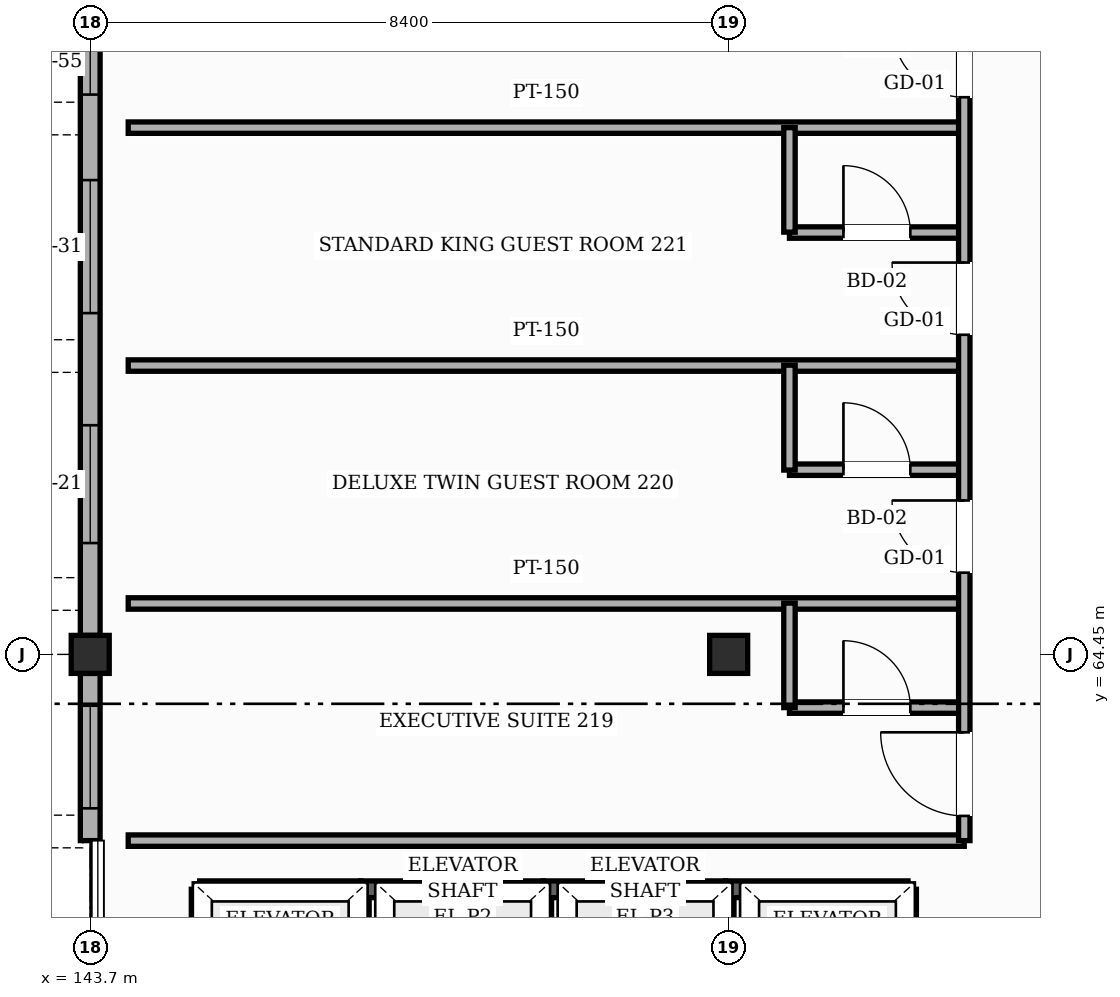
"""IFC4 building model, lengths in metres.
Left out: names, types, materials, properties, quantities, classifications, styles, units other than length and angle.
Written with IfcOpenShell. Run it as: python <this file> out.ifc"""

import sys

from ifc_helpers import new_model, si_unit, direction, frame, frame_2d, origin, origin_2d, place, context, subcontext, project, spatial, rectangle, hollow_rectangle, extrude, element, fill, save


model = new_model("IFC4")
c1 = context("Model", 3, precision=1e-05, world=origin(), true_north=direction((0.0, 1.0)))
c2 = subcontext(c1, "Body", "Model", "MODEL_VIEW")
j1 = project(units=[si_unit("LENGTHUNIT", "METRE"), si_unit("PLANEANGLEUNIT", "RADIAN")], contexts=[c1])
p1 = place(None, origin())
s1 = spatial("IfcSite", under=j1, at=p1, CompositionType="ELEMENT")
p2 = place(p1, origin())
s2 = spatial("IfcBuilding", under=s1, at=p2, CompositionType="ELEMENT")
p3 = place(p2, frame((0.0, 0.0, 35.4)))
s3 = spatial("IfcBuildingStorey", under=s2, at=p3, CompositionType="ELEMENT", Elevation=35.4)
for number, where, z_axis, x_axis in (
    (1, (143.7, 64.45, 0.0), (0.0, 0.0, 1.0), (1.0, 0.0, 0.0)),
    (2, (152.1, 64.45, 0.0), (0.0, 0.0, 1.0), (1.0, 0.0, 0.0)),
):
    element("IfcColumn", number, at=place(p3, frame(where, z_axis=z_axis, x_axis=x_axis)), inside=s3, PredefinedType="COLUMN", context=c2, shape_type="SweptSolid", body=[
        extrude(hollow_rectangle(XDim=0.5, YDim=0.5, WallThickness=0.022, InnerFilletRadius=0.022, OuterFilletRadius=0.044, at=origin_2d()), origin(), (0.0, 0.0, 1.0), 3.6),
    ])
p4 = place(p3, frame((143.7, 62.0, 0.0), z_axis=(0.0, 0.0, 1.0), x_axis=(0.0, 1.0, 0.0)))
e3 = element("IfcWall", 3, at=p4, inside=s3, PredefinedType="SOLIDWALL", context=c2, shape_type="SweptSolid", body=[
    extrude(rectangle(XDim=2.2, YDim=0.26, at=frame_2d((1.1, 0.0))), origin(), (0.0, 0.0, 1.0), 2.805),
])
p5 = place(p4, frame((0.425, 0.0, 0.85)))
e4 = element("IfcOpeningElement", 4, at=p5, cuts=e3, PredefinedType="OPENING", context=c2, shape_type="SweptSolid", body=[
    extrude(rectangle(XDim=1.35, YDim=1.35, at=frame_2d((0.675, 0.675))), frame((0.0, 0.14, 0.0), z_axis=(0.0, -1.0, 0.0), x_axis=(1.0, 0.0, 0.0)), (0.0, 0.0, 1.0), 0.28),
])
p6 = place(p3, frame((143.7, 64.7, 0.0), z_axis=(0.0, 0.0, 1.0), x_axis=(0.0, 1.0, 0.0)))
e5 = element("IfcWall", 5, at=p6, inside=s3, PredefinedType="SOLIDWALL", context=c2, shape_type="SweptSolid", body=[
    extrude(rectangle(XDim=8.4, YDim=0.26, at=frame_2d((4.2, 0.0))), origin(), (0.0, 0.0, 1.0), 2.655),
])
p7 = place(p6, frame((1.215, 0.0, 0.85)))
e6 = element("IfcOpeningElement", 6, at=p7, cuts=e5, PredefinedType="OPENING", context=c2, shape_type="SweptSolid", body=[
    extrude(rectangle(XDim=1.55, YDim=1.35, at=frame_2d((0.775, 0.675))), frame((0.0, 0.14, 0.0), z_axis=(0.0, -1.0, 0.0), x_axis=(1.0, 0.0, 0.0)), (0.0, 0.0, 1.0), 0.28),
])
p8 = place(p6, frame((4.24, 0.0, 0.85)))
e7 = element("IfcOpeningElement", 7, at=p8, cuts=e5, PredefinedType="OPENING", context=c2, shape_type="SweptSolid", body=[
    extrude(rectangle(XDim=1.75, YDim=1.35, at=frame_2d((0.875, 0.675))), frame((0.0, 0.14, 0.0), z_axis=(0.0, -1.0, 0.0), x_axis=(1.0, 0.0, 0.0)), (0.0, 0.0, 1.0), 0.28),
])
p9 = place(p6, frame((7.115, 0.0, 0.85)))
e8 = element("IfcOpeningElement", 8, at=p9, cuts=e5, PredefinedType="OPENING", context=c2, shape_type="SweptSolid", body=[
    extrude(rectangle(XDim=0.85, YDim=1.35, at=frame_2d((0.425, 0.675))), frame((0.0, 0.14, 0.0), z_axis=(0.0, -1.0, 0.0), x_axis=(1.0, 0.0, 0.0)), (0.0, 0.0, 1.0), 0.28),
])
p10 = place(p3, frame((145.14, 61.36, 0.0), z_axis=(0.0, 0.0, 1.0), x_axis=(1.0, 0.0, 0.0)))
e9 = element("IfcWall", 9, at=p10, inside=s3, PredefinedType="SHEAR", context=c2, shape_type="SweptSolid", body=[
    extrude(rectangle(XDim=2.12, YDim=0.22, at=frame_2d((1.06, 0.0))), origin(), (0.0, 0.0, 1.0), 3.38),
])
for number, where, z_axis, x_axis in (
    (10, (147.26, 59.44, 0.0), (0.0, 0.0, 1.0), (0.0, 1.0, 0.0)),
    (11, (145.14, 59.44, 0.0), (0.0, 0.0, 1.0), (0.0, 1.0, 0.0)),
):
    element("IfcWall", number, at=place(p3, frame(where, z_axis=z_axis, x_axis=x_axis)), inside=s3, PredefinedType="SHEAR", context=c2, shape_type="SweptSolid", body=[
        extrude(rectangle(XDim=1.92, YDim=0.22, at=frame_2d((0.96, 0.0))), origin(), (0.0, 0.0, 1.0), 3.38),
    ])
p11 = place(p3, frame((147.26, 61.36, 0.0), z_axis=(0.0, 0.0, 1.0), x_axis=(1.0, 0.0, 0.0)))
e12 = element("IfcWall", 12, at=p11, inside=s3, PredefinedType="SHEAR", context=c2, shape_type="SweptSolid", body=[
    extrude(rectangle(XDim=2.4, YDim=0.22, at=frame_2d((1.2, 0.0))), origin(), (0.0, 0.0, 1.0), 3.38),
])
p12 = place(p3, frame((149.66, 59.44, 0.0), z_axis=(0.0, 0.0, 1.0), x_axis=(0.0, 1.0, 0.0)))
e13 = element("IfcWall", 13, at=p12, inside=s3, PredefinedType="SHEAR", context=c2, shape_type="SweptSolid", body=[
    extrude(rectangle(XDim=1.92, YDim=0.22, at=frame_2d((0.96, 0.0))), origin(), (0.0, 0.0, 1.0), 3.38),
])
p13 = place(p3, frame((149.66, 61.36, 0.0), z_axis=(0.0, 0.0, 1.0), x_axis=(1.0, 0.0, 0.0)))
e14 = element("IfcWall", 14, at=p13, inside=s3, PredefinedType="SHEAR", context=c2, shape_type="SweptSolid", body=[
    extrude(rectangle(XDim=2.4, YDim=0.22, at=frame_2d((1.2, 0.0))), origin(), (0.0, 0.0, 1.0), 3.38),
])
p14 = place(p3, frame((152.06, 59.44, 0.0), z_axis=(0.0, 0.0, 1.0), x_axis=(0.0, 1.0, 0.0)))
e15 = element("IfcWall", 15, at=p14, inside=s3, PredefinedType="SHEAR", context=c2, shape_type="SweptSolid", body=[
    extrude(rectangle(XDim=1.92, YDim=0.22, at=frame_2d((0.96, 0.0))), origin(), (0.0, 0.0, 1.0), 3.38),
])
p15 = place(p3, frame((152.06, 61.36, 0.0), z_axis=(0.0, 0.0, 1.0), x_axis=(1.0, 0.0, 0.0)))
e16 = element("IfcWall", 16, at=p15, inside=s3, PredefinedType="SHEAR", context=c2, shape_type="SweptSolid", body=[
    extrude(rectangle(XDim=2.4, YDim=0.22, at=frame_2d((1.2, 0.0))), origin(), (0.0, 0.0, 1.0), 3.38),
])
p16 = place(p3, frame((154.46, 59.44, 0.0), z_axis=(0.0, 0.0, 1.0), x_axis=(0.0, 1.0, 0.0)))
e17 = element("IfcWall", 17, at=p16, inside=s3, PredefinedType="SHEAR", context=c2, shape_type="SweptSolid", body=[
    extrude(rectangle(XDim=1.92, YDim=0.22, at=frame_2d((0.96, 0.0))), origin(), (0.0, 0.0, 1.0), 3.38),
])
p17 = place(p3, frame((144.2, 62.0, 0.0), z_axis=(0.0, 0.0, 1.0), x_axis=(1.0, 0.0, 0.0)))
e18 = element("IfcWall", 18, at=p17, inside=s3, PredefinedType="PARTITIONING", context=c2, shape_type="SweptSolid", body=[
    extrude(rectangle(XDim=11.0, YDim=0.15, at=frame_2d((5.5, 0.0))), origin(), (0.0, 0.0, 1.0), 3.365),
])
p18 = place(p3, frame((152.9, 63.75, 0.0), z_axis=(0.0, 0.0, 1.0), x_axis=(1.0, 0.0, 0.0)))
e19 = element("IfcWall", 19, at=p18, inside=s3, PredefinedType="PARTITIONING", context=c2, shape_type="SweptSolid", body=[
    extrude(rectangle(XDim=2.3, YDim=0.15, at=frame_2d((1.15, 0.0))), origin(), (0.0, 0.0, 1.0), 3.365),
])
p19 = place(p18, frame((0.71, 0.0, 0.0)))
e20 = element("IfcOpeningElement", 20, at=p19, cuts=e19, PredefinedType="OPENING", context=c2, shape_type="SweptSolid", body=[
    extrude(rectangle(XDim=0.88, YDim=2.12, at=frame_2d((0.44, 1.06))), frame((0.0, 0.085, 0.0), z_axis=(0.0, -1.0, 0.0), x_axis=(1.0, 0.0, 0.0)), (0.0, 0.0, 1.0), 0.17),
])
p20 = place(p3, frame((144.2, 65.12, 0.0), z_axis=(0.0, 0.0, 1.0), x_axis=(1.0, 0.0, 0.0)))
e21 = element("IfcWall", 21, at=p20, inside=s3, PredefinedType="PARTITIONING", context=c2, shape_type="SweptSolid", body=[
    extrude(rectangle(XDim=11.0, YDim=0.15, at=frame_2d((5.5, 0.0))), origin(), (0.0, 0.0, 1.0), 3.365),
])
p21 = place(p3, frame((152.9, 66.88, 0.0), z_axis=(0.0, 0.0, 1.0), x_axis=(1.0, 0.0, 0.0)))
e22 = element("IfcWall", 22, at=p21, inside=s3, PredefinedType="PARTITIONING", context=c2, shape_type="SweptSolid", body=[
    extrude(rectangle(XDim=2.3, YDim=0.15, at=frame_2d((1.15, 0.0))), origin(), (0.0, 0.0, 1.0), 3.365),
])
p22 = place(p21, frame((0.71, 0.0, 0.0)))
e23 = element("IfcOpeningElement", 23, at=p22, cuts=e22, PredefinedType="OPENING", context=c2, shape_type="SweptSolid", body=[
    extrude(rectangle(XDim=0.88, YDim=2.12, at=frame_2d((0.44, 1.06))), frame((0.0, 0.085, 0.0), z_axis=(0.0, -1.0, 0.0), x_axis=(1.0, 0.0, 0.0)), (0.0, 0.0, 1.0), 0.17),
])
p23 = place(p3, frame((144.2, 68.25, 0.0), z_axis=(0.0, 0.0, 1.0), x_axis=(1.0, 0.0, 0.0)))
e24 = element("IfcWall", 24, at=p23, inside=s3, PredefinedType="PARTITIONING", context=c2, shape_type="SweptSolid", body=[
    extrude(rectangle(XDim=11.0, YDim=0.15, at=frame_2d((5.5, 0.0))), origin(), (0.0, 0.0, 1.0), 3.365),
])
p24 = place(p3, frame((152.9, 70.0, 0.0), z_axis=(0.0, 0.0, 1.0), x_axis=(1.0, 0.0, 0.0)))
e25 = element("IfcWall", 25, at=p24, inside=s3, PredefinedType="PARTITIONING", context=c2, shape_type="SweptSolid", body=[
    extrude(rectangle(XDim=2.3, YDim=0.15, at=frame_2d((1.15, 0.0))), origin(), (0.0, 0.0, 1.0), 3.365),
])
p25 = place(p24, frame((0.71, 0.0, 0.0)))
e26 = element("IfcOpeningElement", 26, at=p25, cuts=e25, PredefinedType="OPENING", context=c2, shape_type="SweptSolid", body=[
    extrude(rectangle(XDim=0.88, YDim=2.12, at=frame_2d((0.44, 1.06))), frame((0.0, 0.085, 0.0), z_axis=(0.0, -1.0, 0.0), x_axis=(1.0, 0.0, 0.0)), (0.0, 0.0, 1.0), 0.17),
])
p26 = place(p3, frame((144.2, 71.38, 0.0), z_axis=(0.0, 0.0, 1.0), x_axis=(1.0, 0.0, 0.0)))
e27 = element("IfcWall", 27, at=p26, inside=s3, PredefinedType="PARTITIONING", context=c2, shape_type="SweptSolid", body=[
    extrude(rectangle(XDim=11.0, YDim=0.15, at=frame_2d((5.5, 0.0))), origin(), (0.0, 0.0, 1.0), 3.365),
])
p27 = place(p3, frame((152.9, 63.75, 0.0), z_axis=(0.0, 0.0, 1.0), x_axis=(0.0, 1.0, 0.0)))
e28 = element("IfcWall", 28, at=p27, inside=s3, PredefinedType="PARTITIONING", context=c2, shape_type="SweptSolid", body=[
    extrude(rectangle(XDim=1.375, YDim=0.15, at=frame_2d((0.688, 0.0))), origin(), (0.0, 0.0, 1.0), 3.365),
])
p28 = place(p3, frame((152.9, 66.875, 0.0), z_axis=(0.0, 0.0, 1.0), x_axis=(0.0, 1.0, 0.0)))
e29 = element("IfcWall", 29, at=p28, inside=s3, PredefinedType="PARTITIONING", context=c2, shape_type="SweptSolid", body=[
    extrude(rectangle(XDim=1.38, YDim=0.15, at=frame_2d((0.69, 0.0))), origin(), (0.0, 0.0, 1.0), 3.365),
])
p29 = place(p3, frame((152.9, 70.005, 0.0), z_axis=(0.0, 0.0, 1.0), x_axis=(0.0, 1.0, 0.0)))
e30 = element("IfcWall", 30, at=p29, inside=s3, PredefinedType="PARTITIONING", context=c2, shape_type="SweptSolid", body=[
    extrude(rectangle(XDim=1.375, YDim=0.15, at=frame_2d((0.688, 0.0))), origin(), (0.0, 0.0, 1.0), 3.365),
])
p30 = place(p3, frame((155.2, 62.0, 0.0), z_axis=(0.0, 0.0, 1.0), x_axis=(0.0, 1.0, 0.0)))
e31 = element("IfcWall", 31, at=p30, inside=s3, PredefinedType="PARTITIONING", context=c2, shape_type="SweptSolid", body=[
    extrude(rectangle(XDim=34.4, YDim=0.15, at=frame_2d((17.2, 0.0))), origin(), (0.0, 0.0, 1.0), 3.365),
])
p31 = place(p30, frame((0.325, 0.0, 0.0)))
e32 = element("IfcOpeningElement", 32, at=p31, cuts=e31, PredefinedType="OPENING", context=c2, shape_type="SweptSolid", body=[
    extrude(rectangle(XDim=1.1, YDim=2.2, at=frame_2d((0.55, 1.1))), frame((0.0, 0.085, 0.0), z_axis=(0.0, -1.0, 0.0), x_axis=(1.0, 0.0, 0.0)), (0.0, 0.0, 1.0), 0.17),
])
p32 = place(p30, frame((3.525, 0.0, 0.0)))
e33 = element("IfcOpeningElement", 33, at=p32, cuts=e31, PredefinedType="OPENING", context=c2, shape_type="SweptSolid", body=[
    extrude(rectangle(XDim=0.95, YDim=2.15, at=frame_2d((0.475, 1.075))), frame((0.0, 0.085, 0.0), z_axis=(0.0, -1.0, 0.0), x_axis=(1.0, 0.0, 0.0)), (0.0, 0.0, 1.0), 0.17),
])
p33 = place(p30, frame((6.655, 0.0, 0.0)))
e34 = element("IfcOpeningElement", 34, at=p33, cuts=e31, PredefinedType="OPENING", context=c2, shape_type="SweptSolid", body=[
    extrude(rectangle(XDim=0.95, YDim=2.15, at=frame_2d((0.475, 1.075))), frame((0.0, 0.085, 0.0), z_axis=(0.0, -1.0, 0.0), x_axis=(1.0, 0.0, 0.0)), (0.0, 0.0, 1.0), 0.17),
])
p34 = place(p30, frame((9.78, 0.0, 0.0)))
e35 = element("IfcOpeningElement", 35, at=p34, cuts=e31, PredefinedType="OPENING", context=c2, shape_type="SweptSolid", body=[
    extrude(rectangle(XDim=0.95, YDim=2.15, at=frame_2d((0.475, 1.075))), frame((0.0, 0.085, 0.0), z_axis=(0.0, -1.0, 0.0), x_axis=(1.0, 0.0, 0.0)), (0.0, 0.0, 1.0), 0.17),
])
p35 = place(p30, frame((12.91, 0.0, 0.0)))
e36 = element("IfcOpeningElement", 36, at=p35, cuts=e31, PredefinedType="OPENING", context=c2, shape_type="SweptSolid", body=[
    extrude(rectangle(XDim=0.95, YDim=2.15, at=frame_2d((0.475, 1.075))), frame((0.0, 0.085, 0.0), z_axis=(0.0, -1.0, 0.0), x_axis=(1.0, 0.0, 0.0)), (0.0, 0.0, 1.0), 0.17),
])
p36 = place(p30, frame((16.035, 0.0, 0.0)))
e37 = element("IfcOpeningElement", 37, at=p36, cuts=e31, PredefinedType="OPENING", context=c2, shape_type="SweptSolid", body=[
    extrude(rectangle(XDim=0.95, YDim=2.15, at=frame_2d((0.475, 1.075))), frame((0.0, 0.085, 0.0), z_axis=(0.0, -1.0, 0.0), x_axis=(1.0, 0.0, 0.0)), (0.0, 0.0, 1.0), 0.17),
])
p37 = place(p30, frame((19.165, 0.0, 0.0)))
e38 = element("IfcOpeningElement", 38, at=p37, cuts=e31, PredefinedType="OPENING", context=c2, shape_type="SweptSolid", body=[
    extrude(rectangle(XDim=0.95, YDim=2.15, at=frame_2d((0.475, 1.075))), frame((0.0, 0.085, 0.0), z_axis=(0.0, -1.0, 0.0), x_axis=(1.0, 0.0, 0.0)), (0.0, 0.0, 1.0), 0.17),
])
p38 = place(p30, frame((22.29, 0.0, 0.0)))
e39 = element("IfcOpeningElement", 39, at=p38, cuts=e31, PredefinedType="OPENING", context=c2, shape_type="SweptSolid", body=[
    extrude(rectangle(XDim=0.95, YDim=2.15, at=frame_2d((0.475, 1.075))), frame((0.0, 0.085, 0.0), z_axis=(0.0, -1.0, 0.0), x_axis=(1.0, 0.0, 0.0)), (0.0, 0.0, 1.0), 0.17),
])
p39 = place(p30, frame((25.42, 0.0, 0.0)))
e40 = element("IfcOpeningElement", 40, at=p39, cuts=e31, PredefinedType="OPENING", context=c2, shape_type="SweptSolid", body=[
    extrude(rectangle(XDim=0.95, YDim=2.15, at=frame_2d((0.475, 1.075))), frame((0.0, 0.085, 0.0), z_axis=(0.0, -1.0, 0.0), x_axis=(1.0, 0.0, 0.0)), (0.0, 0.0, 1.0), 0.17),
])
p40 = place(p30, frame((28.545, 0.0, 0.0)))
e41 = element("IfcOpeningElement", 41, at=p40, cuts=e31, PredefinedType="OPENING", context=c2, shape_type="SweptSolid", body=[
    extrude(rectangle(XDim=0.95, YDim=2.15, at=frame_2d((0.475, 1.075))), frame((0.0, 0.085, 0.0), z_axis=(0.0, -1.0, 0.0), x_axis=(1.0, 0.0, 0.0)), (0.0, 0.0, 1.0), 0.17),
])
p41 = place(p30, frame((31.675, 0.0, 0.0)))
e42 = element("IfcOpeningElement", 42, at=p41, cuts=e31, PredefinedType="OPENING", context=c2, shape_type="SweptSolid", body=[
    extrude(rectangle(XDim=0.95, YDim=2.15, at=frame_2d((0.475, 1.075))), frame((0.0, 0.085, 0.0), z_axis=(0.0, -1.0, 0.0), x_axis=(1.0, 0.0, 0.0)), (0.0, 0.0, 1.0), 0.17),
])
p42 = place(p5, origin())
e43 = element("IfcWindow", 43, at=p42, inside=s3, PartitioningType="SINGLE_PANEL", PredefinedType="WINDOW", context=c2, shape_type="SweptSolid", body=[
    extrude(rectangle(XDim=1.35, YDim=1.35, at=frame_2d((0.675, 0.675))), frame((0.0, 0.03, 0.0), z_axis=(0.0, -1.0, 0.0), x_axis=(1.0, 0.0, 0.0)), (0.0, 0.0, 1.0), 0.06),
])
fill(e4, e43)
p43 = place(p7, origin())
e44 = element("IfcWindow", 44, at=p43, inside=s3, PartitioningType="SINGLE_PANEL", PredefinedType="WINDOW", context=c2, shape_type="SweptSolid", body=[
    extrude(rectangle(XDim=1.55, YDim=1.35, at=frame_2d((0.775, 0.675))), frame((0.0, 0.03, 0.0), z_axis=(0.0, -1.0, 0.0), x_axis=(1.0, 0.0, 0.0)), (0.0, 0.0, 1.0), 0.06),
])
fill(e6, e44)
p44 = place(p8, origin())
e45 = element("IfcWindow", 45, at=p44, inside=s3, PartitioningType="SINGLE_PANEL", PredefinedType="WINDOW", context=c2, shape_type="SweptSolid", body=[
    extrude(rectangle(XDim=1.75, YDim=1.35, at=frame_2d((0.875, 0.675))), frame((0.0, 0.03, 0.0), z_axis=(0.0, -1.0, 0.0), x_axis=(1.0, 0.0, 0.0)), (0.0, 0.0, 1.0), 0.06),
])
fill(e7, e45)
p45 = place(p9, origin())
e46 = element("IfcWindow", 46, at=p45, inside=s3, PartitioningType="SINGLE_PANEL", PredefinedType="WINDOW", context=c2, shape_type="SweptSolid", body=[
    extrude(rectangle(XDim=0.85, YDim=1.35, at=frame_2d((0.425, 0.675))), frame((0.0, 0.03, 0.0), z_axis=(0.0, -1.0, 0.0), x_axis=(1.0, 0.0, 0.0)), (0.0, 0.0, 1.0), 0.06),
])
fill(e8, e46)
p46 = place(p31, origin())
e47 = element("IfcDoor", 47, at=p46, inside=s3, OperationType="SINGLE_SWING_RIGHT", PredefinedType="DOOR", context=c2, shape_type="SweptSolid", body=[
    extrude(rectangle(XDim=1.1, YDim=2.2, at=frame_2d((0.55, 1.1))), frame((0.0, 0.025, 0.0), z_axis=(0.0, -1.0, 0.0), x_axis=(1.0, 0.0, 0.0)), (0.0, 0.0, 1.0), 0.05),
])
fill(e32, e47)
p47 = place(p19, origin())
e48 = element("IfcDoor", 48, at=p47, inside=s3, OperationType="SINGLE_SWING_LEFT", PredefinedType="DOOR", context=c2, shape_type="SweptSolid", body=[
    extrude(rectangle(XDim=0.88, YDim=2.12, at=frame_2d((0.44, 1.06))), frame((0.0, 0.025, 0.0), z_axis=(0.0, -1.0, 0.0), x_axis=(1.0, 0.0, 0.0)), (0.0, 0.0, 1.0), 0.05),
])
fill(e20, e48)
p48 = place(p32, origin())
e49 = element("IfcDoor", 49, at=p48, inside=s3, OperationType="SINGLE_SWING_RIGHT", PredefinedType="DOOR", context=c2, shape_type="SweptSolid", body=[
    extrude(rectangle(XDim=0.95, YDim=2.15, at=frame_2d((0.475, 1.075))), frame((0.0, 0.025, 0.0), z_axis=(0.0, -1.0, 0.0), x_axis=(1.0, 0.0, 0.0)), (0.0, 0.0, 1.0), 0.05),
])
fill(e33, e49)
p49 = place(p22, origin())
e50 = element("IfcDoor", 50, at=p49, inside=s3, OperationType="SINGLE_SWING_LEFT", PredefinedType="DOOR", context=c2, shape_type="SweptSolid", body=[
    extrude(rectangle(XDim=0.88, YDim=2.12, at=frame_2d((0.44, 1.06))), frame((0.0, 0.025, 0.0), z_axis=(0.0, -1.0, 0.0), x_axis=(1.0, 0.0, 0.0)), (0.0, 0.0, 1.0), 0.05),
])
fill(e23, e50)
p50 = place(p33, origin())
e51 = element("IfcDoor", 51, at=p50, inside=s3, OperationType="SINGLE_SWING_RIGHT", PredefinedType="DOOR", context=c2, shape_type="SweptSolid", body=[
    extrude(rectangle(XDim=0.95, YDim=2.15, at=frame_2d((0.475, 1.075))), frame((0.0, 0.025, 0.0), z_axis=(0.0, -1.0, 0.0), x_axis=(1.0, 0.0, 0.0)), (0.0, 0.0, 1.0), 0.05),
])
fill(e34, e51)
p51 = place(p25, origin())
e52 = element("IfcDoor", 52, at=p51, inside=s3, OperationType="SINGLE_SWING_LEFT", PredefinedType="DOOR", context=c2, shape_type="SweptSolid", body=[
    extrude(rectangle(XDim=0.88, YDim=2.12, at=frame_2d((0.44, 1.06))), frame((0.0, 0.025, 0.0), z_axis=(0.0, -1.0, 0.0), x_axis=(1.0, 0.0, 0.0)), (0.0, 0.0, 1.0), 0.05),
])
fill(e26, e52)
p52 = place(p34, origin())
e53 = element("IfcDoor", 53, at=p52, inside=s3, OperationType="SINGLE_SWING_RIGHT", PredefinedType="DOOR", context=c2, shape_type="SweptSolid", body=[
    extrude(rectangle(XDim=0.95, YDim=2.15, at=frame_2d((0.475, 1.075))), frame((0.0, 0.025, 0.0), z_axis=(0.0, -1.0, 0.0), x_axis=(1.0, 0.0, 0.0)), (0.0, 0.0, 1.0), 0.05),
])
fill(e35, e53)
save(model, sys.argv[1])
